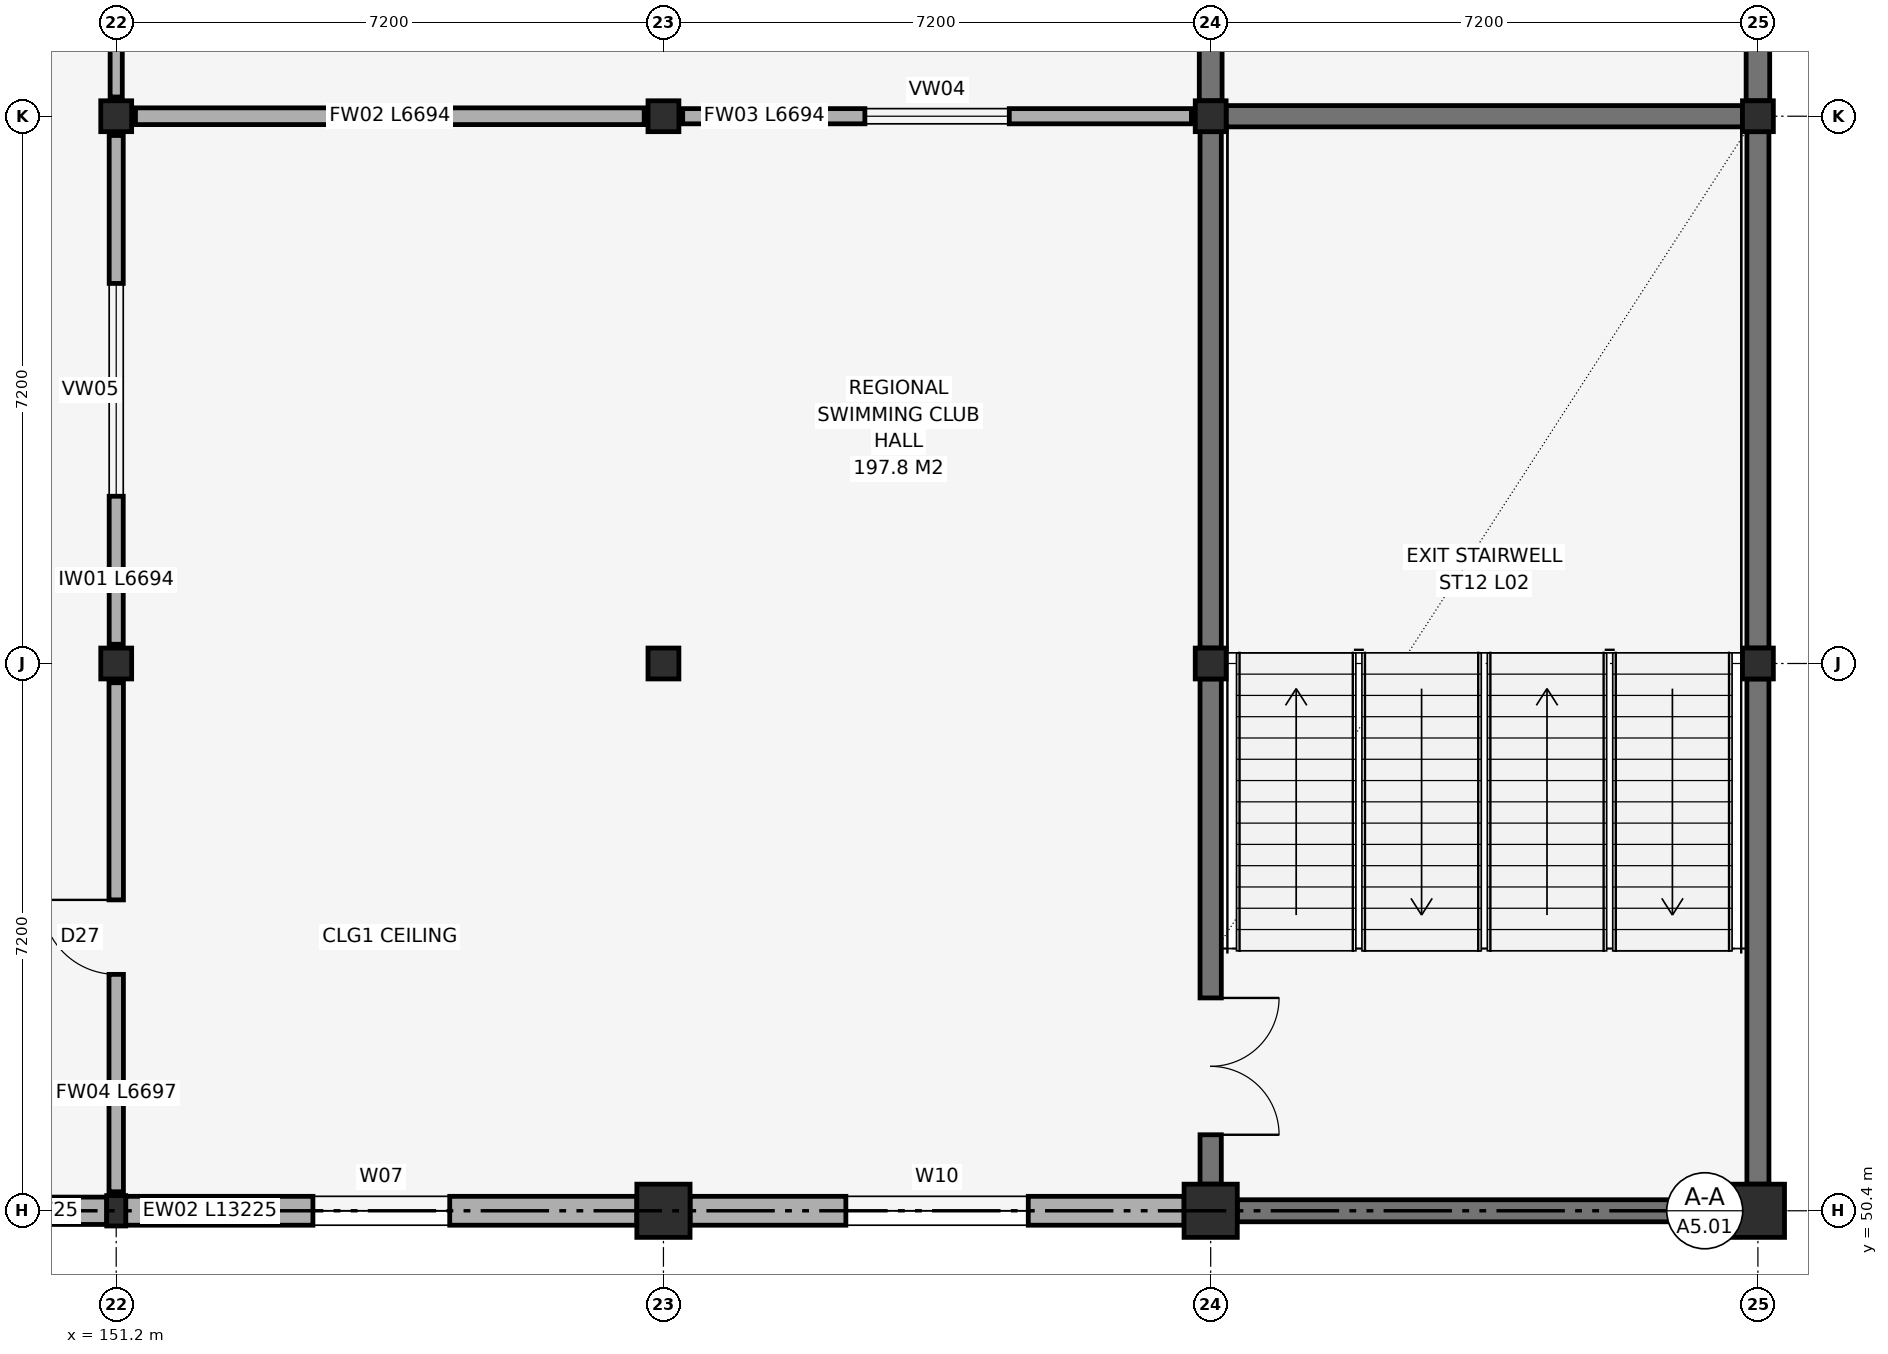
"""IFC4 building model, lengths in metres.
Left out: names, types, materials, properties, quantities, classifications, styles, units other than length and angle.
Written with IfcOpenShell. Run it as: python <this file> out.ifc"""

import sys

from ifc_helpers import new_model, si_unit, direction, frame, frame_2d, origin, origin_2d, place, context, subcontext, project, spatial, rectangle, hollow_rectangle, hollow_circle, extrude, element, fill, save


model = new_model("IFC4")
c1 = context("Model", 3, precision=1e-05, world=origin(), true_north=direction((0.0, 1.0)))
c2 = subcontext(c1, "Body", "Model", "MODEL_VIEW")
j1 = project(units=[si_unit("LENGTHUNIT", "METRE"), si_unit("PLANEANGLEUNIT", "RADIAN")], contexts=[c1])
p1 = place(None, origin())
s1 = spatial("IfcSite", under=j1, at=p1, CompositionType="ELEMENT")
p2 = place(p1, origin())
s2 = spatial("IfcBuilding", under=s1, at=p2, CompositionType="ELEMENT")
p3 = place(p2, frame((0.0, 0.0, 10.2)))
s3 = spatial("IfcBuildingStorey", under=s2, at=p3, CompositionType="ELEMENT", Elevation=10.2)
p4 = place(p3, frame((151.2, 50.4, 0.0), z_axis=(0.0, 0.0, 1.0), x_axis=(1.0, 0.0, 0.0)))
e1 = element("IfcColumn", 1, at=p4, inside=s3, PredefinedType="COLUMN", context=c2, shape_type="SweptSolid", body=[
    extrude(hollow_rectangle(XDim=0.25, YDim=0.4, WallThickness=0.014, at=origin_2d()), origin(), (0.0, 0.0, 1.0), 4.8),
])
for number, where, z_axis, x_axis in (
    (2, (151.2, 57.6, 0.0), (0.0, 0.0, 1.0), (1.0, 0.0, 0.0)),
    (3, (151.2, 64.8, 0.0), (0.0, 0.0, 1.0), (1.0, 0.0, 0.0)),
):
    element("IfcColumn", number, at=place(p3, frame(where, z_axis=z_axis, x_axis=x_axis)), inside=s3, PredefinedType="COLUMN", context=c2, shape_type="SweptSolid", body=[
        extrude(hollow_circle(Radius=0.203, WallThickness=0.016, at=origin_2d()), origin(), (0.0, 0.0, 1.0), 4.8),
    ])
p5 = place(p3, frame((158.4, 50.4, 0.0), z_axis=(0.0, 0.0, 1.0), x_axis=(1.0, 0.0, 0.0)))
e4 = element("IfcColumn", 4, at=p5, inside=s3, PredefinedType="COLUMN", context=c2, shape_type="SweptSolid", body=[
    extrude(rectangle(XDim=0.7, YDim=0.7, at=origin_2d()), origin(), (0.0, 0.0, 1.0), 4.8),
])
for number, where, z_axis, x_axis in (
    (5, (158.4, 57.6, 0.0), (0.0, 0.0, 1.0), (1.0, 0.0, 0.0)),
    (6, (158.4, 64.8, 0.0), (0.0, 0.0, 1.0), (1.0, 0.0, 0.0)),
):
    element("IfcColumn", number, at=place(p3, frame(where, z_axis=z_axis, x_axis=x_axis)), inside=s3, PredefinedType="COLUMN", context=c2, shape_type="SweptSolid", body=[
        extrude(hollow_circle(Radius=0.203, WallThickness=0.016, at=origin_2d()), origin(), (0.0, 0.0, 1.0), 4.8),
    ])
p6 = place(p3, frame((165.6, 50.4, 0.0), z_axis=(0.0, 0.0, 1.0), x_axis=(1.0, 0.0, 0.0)))
e7 = element("IfcColumn", 7, at=p6, inside=s3, PredefinedType="COLUMN", context=c2, shape_type="SweptSolid", body=[
    extrude(rectangle(XDim=0.7, YDim=0.7, at=origin_2d()), origin(), (0.0, 0.0, 1.0), 4.8),
])
for number, where, z_axis, x_axis in (
    (8, (165.6, 57.6, 0.0), (0.0, 0.0, 1.0), (1.0, 0.0, 0.0)),
    (9, (165.6, 64.8, 0.0), (0.0, 0.0, 1.0), (1.0, 0.0, 0.0)),
):
    element("IfcColumn", number, at=place(p3, frame(where, z_axis=z_axis, x_axis=x_axis)), inside=s3, PredefinedType="COLUMN", context=c2, shape_type="SweptSolid", body=[
        extrude(hollow_circle(Radius=0.203, WallThickness=0.016, at=origin_2d()), origin(), (0.0, 0.0, 1.0), 4.8),
    ])
p7 = place(p3, frame((172.8, 50.4, 0.0), z_axis=(0.0, 0.0, 1.0), x_axis=(1.0, 0.0, 0.0)))
e10 = element("IfcColumn", 10, at=p7, inside=s3, PredefinedType="COLUMN", context=c2, shape_type="SweptSolid", body=[
    extrude(rectangle(XDim=0.7, YDim=0.7, at=origin_2d()), origin(), (0.0, 0.0, 1.0), 4.8),
])
for number, where, z_axis, x_axis in (
    (11, (172.8, 57.6, 0.0), (0.0, 0.0, 1.0), (1.0, 0.0, 0.0)),
    (12, (172.8, 64.8, 0.0), (0.0, 0.0, 1.0), (1.0, 0.0, 0.0)),
):
    element("IfcColumn", number, at=place(p3, frame(where, z_axis=z_axis, x_axis=x_axis)), inside=s3, PredefinedType="COLUMN", context=c2, shape_type="SweptSolid", body=[
        extrude(hollow_circle(Radius=0.203, WallThickness=0.016, at=origin_2d()), origin(), (0.0, 0.0, 1.0), 4.8),
    ])
p8 = place(p3, frame((144.35, 50.4, 0.0), z_axis=(0.0, 0.0, 1.0), x_axis=(1.0, 0.0, 0.0)))
e13 = element("IfcWall", 13, at=p8, inside=s3, PredefinedType="SOLIDWALL", context=c2, shape_type="SweptSolid", body=[
    extrude(rectangle(XDim=6.725, YDim=0.36, at=frame_2d((3.362, 0.0))), origin(), (0.0, 0.0, 1.0), 4.072),
])
p9 = place(p8, frame((2.612, 0.0, 0.95)))
e14 = element("IfcOpeningElement", 14, at=p9, cuts=e13, PredefinedType="OPENING", context=c2, shape_type="SweptSolid", body=[
    extrude(rectangle(XDim=1.5, YDim=2.2, at=frame_2d((0.75, 1.1))), frame((0.0, 0.195, 0.0), z_axis=(0.0, -1.0, 0.0), x_axis=(1.0, 0.0, 0.0)), (0.0, 0.0, 1.0), 0.39),
])
p10 = place(p3, frame((151.325, 50.4, 0.0), z_axis=(0.0, 0.0, 1.0), x_axis=(1.0, 0.0, 0.0)))
e15 = element("IfcWall", 15, at=p10, inside=s3, PredefinedType="SOLIDWALL", context=c2, shape_type="SweptSolid", body=[
    extrude(rectangle(XDim=6.725, YDim=0.38, at=frame_2d((3.363, 0.0))), origin(), (0.0, 0.0, 1.0), 4.072),
])
p11 = place(p10, frame((2.463, 0.0, 0.95)))
e16 = element("IfcOpeningElement", 16, at=p11, cuts=e15, PredefinedType="OPENING", context=c2, shape_type="SweptSolid", body=[
    extrude(rectangle(XDim=1.8, YDim=2.0, at=frame_2d((0.9, 1.0))), frame((0.0, 0.205, 0.0), z_axis=(0.0, -1.0, 0.0), x_axis=(1.0, 0.0, 0.0)), (0.0, 0.0, 1.0), 0.41),
])
p12 = place(p3, frame((158.75, 50.4, 0.0), z_axis=(0.0, 0.0, 1.0), x_axis=(1.0, 0.0, 0.0)))
e17 = element("IfcWall", 17, at=p12, inside=s3, PredefinedType="SOLIDWALL", context=c2, shape_type="SweptSolid", body=[
    extrude(rectangle(XDim=6.5, YDim=0.38, at=frame_2d((3.25, 0.0))), origin(), (0.0, 0.0, 1.0), 4.072),
])
p13 = place(p12, frame((2.05, 0.0, 0.95)))
e18 = element("IfcOpeningElement", 18, at=p13, cuts=e17, PredefinedType="OPENING", context=c2, shape_type="SweptSolid", body=[
    extrude(rectangle(XDim=2.4, YDim=1.75, at=frame_2d((1.2, 0.875))), frame((0.0, 0.205, 0.0), z_axis=(0.0, -1.0, 0.0), x_axis=(1.0, 0.0, 0.0)), (0.0, 0.0, 1.0), 0.41),
])
p14 = place(p3, frame((165.95, 50.4, 0.0), z_axis=(0.0, 0.0, 1.0), x_axis=(1.0, 0.0, 0.0)))
e19 = element("IfcWall", 19, at=p14, inside=s3, PredefinedType="SHEAR", context=c2, shape_type="SweptSolid", body=[
    extrude(rectangle(XDim=6.5, YDim=0.29, at=frame_2d((3.25, 0.0))), origin(), (0.0, 0.0, 1.0), 4.56),
])
p15 = place(p3, frame((165.803, 64.8, 0.0), z_axis=(0.0, 0.0, 1.0), x_axis=(1.0, 0.0, 0.0)))
e20 = element("IfcWall", 20, at=p15, inside=s3, PredefinedType="SHEAR", context=c2, shape_type="SweptSolid", body=[
    extrude(rectangle(XDim=6.793, YDim=0.28, at=frame_2d((3.397, 0.0))), origin(), (0.0, 0.0, 1.0), 4.56),
])
p16 = place(p3, frame((165.6, 50.75, 0.0), z_axis=(0.0, 0.0, 1.0), x_axis=(0.0, 1.0, 0.0)))
e21 = element("IfcWall", 21, at=p16, inside=s3, PredefinedType="SHEAR", context=c2, shape_type="SweptSolid", body=[
    extrude(rectangle(XDim=6.647, YDim=0.28, at=frame_2d((3.323, 0.0))), origin(), (0.0, 0.0, 1.0), 4.56),
])
p17 = place(p16, frame((0.65, 0.0, 0.0)))
e22 = element("IfcOpeningElement", 22, at=p17, cuts=e21, PredefinedType="OPENING", context=c2, shape_type="SweptSolid", body=[
    extrude(rectangle(XDim=1.8, YDim=2.2, at=frame_2d((0.9, 1.1))), frame((0.0, 0.155, 0.0), z_axis=(0.0, -1.0, 0.0), x_axis=(1.0, 0.0, 0.0)), (0.0, 0.0, 1.0), 0.31),
])
p18 = place(p3, frame((165.6, 57.803, 0.0), z_axis=(0.0, 0.0, 1.0), x_axis=(0.0, 1.0, 0.0)))
e23 = element("IfcWall", 23, at=p18, inside=s3, PredefinedType="SHEAR", context=c2, shape_type="SweptSolid", body=[
    extrude(rectangle(XDim=6.793, YDim=0.28, at=frame_2d((3.397, 0.0))), origin(), (0.0, 0.0, 1.0), 4.56),
])
p19 = place(p3, frame((172.8, 50.75, 0.0), z_axis=(0.0, 0.0, 1.0), x_axis=(0.0, 1.0, 0.0)))
e24 = element("IfcWall", 24, at=p19, inside=s3, PredefinedType="SHEAR", context=c2, shape_type="SweptSolid", body=[
    extrude(rectangle(XDim=6.647, YDim=0.29, at=frame_2d((3.323, 0.0))), origin(), (0.0, 0.0, 1.0), 4.56),
])
p20 = place(p3, frame((172.8, 57.803, 0.0), z_axis=(0.0, 0.0, 1.0), x_axis=(0.0, 1.0, 0.0)))
e25 = element("IfcWall", 25, at=p20, inside=s3, PredefinedType="SHEAR", context=c2, shape_type="SweptSolid", body=[
    extrude(rectangle(XDim=6.793, YDim=0.29, at=frame_2d((3.397, 0.0))), origin(), (0.0, 0.0, 1.0), 4.56),
])
p21 = place(p3, frame((165.6, 65.003, 0.0), z_axis=(0.0, 0.0, 1.0), x_axis=(0.0, 1.0, 0.0)))
e26 = element("IfcWall", 26, at=p21, inside=s3, PredefinedType="SHEAR", context=c2, shape_type="SweptSolid", body=[
    extrude(rectangle(XDim=6.794, YDim=0.3, at=frame_2d((3.397, 0.0))), origin(), (0.0, 0.0, 1.0), 4.56),
])
p22 = place(p21, frame((0.797, 0.0, 0.0)))
e27 = element("IfcOpeningElement", 27, at=p22, cuts=e26, PredefinedType="OPENING", context=c2, shape_type="SweptSolid", body=[
    extrude(rectangle(XDim=1.8, YDim=2.2, at=frame_2d((0.9, 1.1))), frame((0.0, 0.165, 0.0), z_axis=(0.0, -1.0, 0.0), x_axis=(1.0, 0.0, 0.0)), (0.0, 0.0, 1.0), 0.33),
])
p23 = place(p3, frame((172.8, 65.003, 0.0), z_axis=(0.0, 0.0, 1.0), x_axis=(0.0, 1.0, 0.0)))
e28 = element("IfcWall", 28, at=p23, inside=s3, PredefinedType="SHEAR", context=c2, shape_type="SweptSolid", body=[
    extrude(rectangle(XDim=6.794, YDim=0.31, at=frame_2d((3.397, 0.0))), origin(), (0.0, 0.0, 1.0), 4.56),
])
p24 = place(p3, frame((151.453, 64.8, 0.0), z_axis=(0.0, 0.0, 1.0), x_axis=(1.0, 0.0, 0.0)))
e29 = element("IfcWall", 29, at=p24, inside=s3, PredefinedType="SOLIDWALL", context=c2, shape_type="SweptSolid", body=[
    extrude(rectangle(XDim=6.694, YDim=0.22, at=frame_2d((3.347, 0.0))), origin(), (0.0, 0.0, 1.0), 4.072),
])
p25 = place(p3, frame((158.653, 64.8, 0.0), z_axis=(0.0, 0.0, 1.0), x_axis=(1.0, 0.0, 0.0)))
e30 = element("IfcWall", 30, at=p25, inside=s3, PredefinedType="SOLIDWALL", context=c2, shape_type="SweptSolid", body=[
    extrude(rectangle(XDim=6.693, YDim=0.2, at=frame_2d((3.347, 0.0))), origin(), (0.0, 0.0, 1.0), 4.072),
])
p26 = place(p25, frame((2.397, 0.0, 0.95)))
e31 = element("IfcOpeningElement", 31, at=p26, cuts=e30, PredefinedType="OPENING", context=c2, shape_type="SweptSolid", body=[
    extrude(rectangle(XDim=1.9, YDim=1.5, at=frame_2d((0.95, 0.75))), frame((0.0, 0.115, 0.0), z_axis=(0.0, -1.0, 0.0), x_axis=(1.0, 0.0, 0.0)), (0.0, 0.0, 1.0), 0.23),
])
p27 = place(p3, frame((151.2, 50.65, 0.0), z_axis=(0.0, 0.0, 1.0), x_axis=(0.0, 1.0, 0.0)))
e32 = element("IfcWall", 32, at=p27, inside=s3, PredefinedType="SOLIDWALL", context=c2, shape_type="SweptSolid", body=[
    extrude(rectangle(XDim=6.697, YDim=0.19, at=frame_2d((3.348, 0.0))), origin(), (0.0, 0.0, 1.0), 4.072),
])
p28 = place(p27, frame((2.86, 0.0, 0.0)))
e33 = element("IfcOpeningElement", 33, at=p28, cuts=e32, PredefinedType="OPENING", context=c2, shape_type="SweptSolid", body=[
    extrude(rectangle(XDim=0.98, YDim=2.15, at=frame_2d((0.49, 1.075))), frame((0.0, 0.11, 0.0), z_axis=(0.0, -1.0, 0.0), x_axis=(1.0, 0.0, 0.0)), (0.0, 0.0, 1.0), 0.22),
])
p29 = place(p3, frame((151.2, 57.853, 0.0), z_axis=(0.0, 0.0, 1.0), x_axis=(0.0, 1.0, 0.0)))
e34 = element("IfcWall", 34, at=p29, inside=s3, PredefinedType="PARTITIONING", context=c2, shape_type="SweptSolid", body=[
    extrude(rectangle(XDim=6.694, YDim=0.185, at=frame_2d((3.347, 0.0))), origin(), (0.0, 0.0, 1.0), 4.072),
])
p30 = place(p29, frame((1.947, 0.0, 0.95)))
e35 = element("IfcOpeningElement", 35, at=p30, cuts=e34, PredefinedType="OPENING", context=c2, shape_type="SweptSolid", body=[
    extrude(rectangle(XDim=2.8, YDim=1.35, at=frame_2d((1.4, 0.675))), frame((0.0, 0.107, 0.0), z_axis=(0.0, -1.0, 0.0), x_axis=(1.0, 0.0, 0.0)), (0.0, 0.0, 1.0), 0.215),
])
p31 = place(p3, frame((151.2, 65.053, 0.0), z_axis=(0.0, 0.0, 1.0), x_axis=(0.0, 1.0, 0.0)))
e36 = element("IfcWall", 36, at=p31, inside=s3, PredefinedType="PARTITIONING", context=c2, shape_type="SweptSolid", body=[
    extrude(rectangle(XDim=6.694, YDim=0.16, at=frame_2d((3.347, 0.0))), origin(), (0.0, 0.0, 1.0), 4.072),
])
p32 = place(p31, frame((2.867, 0.0, 0.0)))
e37 = element("IfcOpeningElement", 37, at=p32, cuts=e36, PredefinedType="OPENING", context=c2, shape_type="SweptSolid", body=[
    extrude(rectangle(XDim=0.96, YDim=2.15, at=frame_2d((0.48, 1.075))), frame((0.0, 0.095, 0.0), z_axis=(0.0, -1.0, 0.0), x_axis=(1.0, 0.0, 0.0)), (0.0, 0.0, 1.0), 0.19),
])
p33 = place(p11, origin())
e38 = element("IfcWindow", 38, at=p33, inside=s3, PartitioningType="SINGLE_PANEL", PredefinedType="WINDOW", context=c2, shape_type="SweptSolid", body=[
    extrude(rectangle(XDim=1.8, YDim=2.0, at=frame_2d((0.9, 1.0))), frame((0.0, 0.03, 0.0), z_axis=(0.0, -1.0, 0.0), x_axis=(1.0, 0.0, 0.0)), (0.0, 0.0, 1.0), 0.06),
])
fill(e16, e38)
p34 = place(p13, origin())
e39 = element("IfcWindow", 39, at=p34, inside=s3, PartitioningType="SINGLE_PANEL", PredefinedType="WINDOW", context=c2, shape_type="SweptSolid", body=[
    extrude(rectangle(XDim=2.4, YDim=1.75, at=frame_2d((1.2, 0.875))), frame((0.0, 0.03, 0.0), z_axis=(0.0, -1.0, 0.0), x_axis=(1.0, 0.0, 0.0)), (0.0, 0.0, 1.0), 0.06),
])
fill(e18, e39)
p35 = place(p17, frame((1.8, 0.0, 0.0), z_axis=(0.0, 0.0, 1.0), x_axis=(-1.0, 0.0, 0.0)))
e40 = element("IfcDoor", 40, at=p35, inside=s3, OperationType="DOUBLE_SWING_LEFT", PredefinedType="DOOR", context=c2, shape_type="SweptSolid", body=[
    extrude(rectangle(XDim=1.8, YDim=2.2, at=frame_2d((0.9, 1.1))), frame((0.0, 0.025, 0.0), z_axis=(0.0, -1.0, 0.0), x_axis=(1.0, 0.0, 0.0)), (0.0, 0.0, 1.0), 0.05),
])
fill(e22, e40)
p36 = place(p26, origin())
e41 = element("IfcWindow", 41, at=p36, inside=s3, PartitioningType="SINGLE_PANEL", PredefinedType="WINDOW", context=c2, shape_type="SweptSolid", body=[
    extrude(rectangle(XDim=1.9, YDim=1.5, at=frame_2d((0.95, 0.75))), frame((0.0, 0.03, 0.0), z_axis=(0.0, -1.0, 0.0), x_axis=(1.0, 0.0, 0.0)), (0.0, 0.0, 1.0), 0.06),
])
fill(e31, e41)
p37 = place(p28, frame((0.98, 0.0, 0.0), z_axis=(0.0, 0.0, 1.0), x_axis=(-1.0, 0.0, 0.0)))
e42 = element("IfcDoor", 42, at=p37, inside=s3, OperationType="SINGLE_SWING_LEFT", PredefinedType="DOOR", context=c2, shape_type="SweptSolid", body=[
    extrude(rectangle(XDim=0.98, YDim=2.15, at=frame_2d((0.49, 1.075))), frame((0.0, 0.025, 0.0), z_axis=(0.0, -1.0, 0.0), x_axis=(1.0, 0.0, 0.0)), (0.0, 0.0, 1.0), 0.05),
])
fill(e33, e42)
p38 = place(p30, origin())
e43 = element("IfcWindow", 43, at=p38, inside=s3, PartitioningType="SINGLE_PANEL", PredefinedType="WINDOW", context=c2, shape_type="SweptSolid", body=[
    extrude(rectangle(XDim=2.8, YDim=1.35, at=frame_2d((1.4, 0.675))), frame((0.0, 0.03, 0.0), z_axis=(0.0, -1.0, 0.0), x_axis=(1.0, 0.0, 0.0)), (0.0, 0.0, 1.0), 0.06),
])
fill(e35, e43)
save(model, sys.argv[1])
